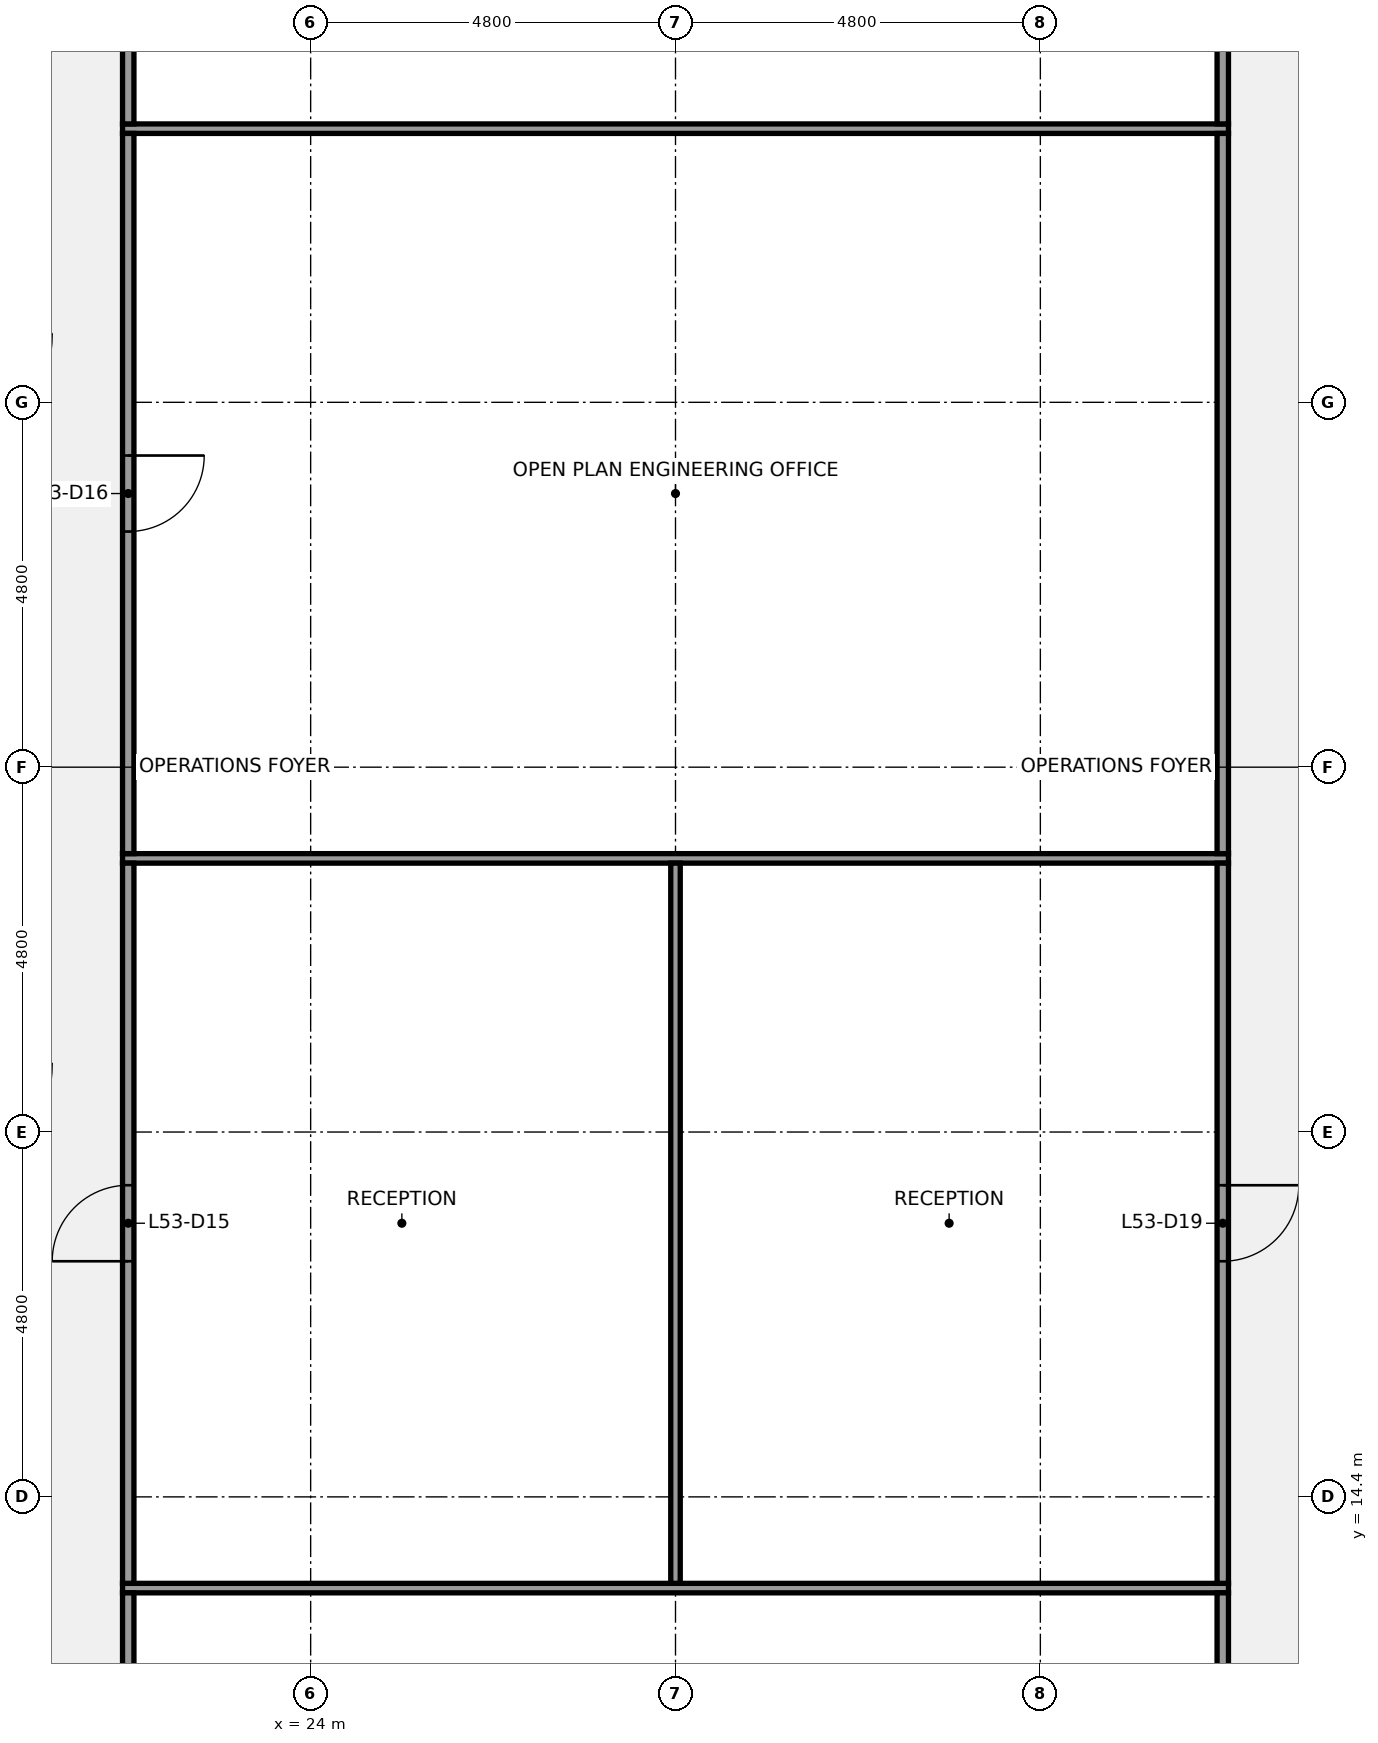
"""IFC4 building model, lengths in metres.
Left out: names, types, materials, properties, quantities, classifications, styles, units other than length and angle.
Written with IfcOpenShell. Run it as: python <this file> out.ifc"""

import sys

from ifc_helpers import new_model, si_unit, direction, frame, frame_2d, origin, place, context, subcontext, project, spatial, rectangle, extrude, element, fill, save


model = new_model("IFC4")
c1 = context("Model", 3, precision=1e-05, world=origin(), true_north=direction((0.0, 1.0)))
c2 = subcontext(c1, "Body", "Model", "MODEL_VIEW")
j1 = project(units=[si_unit("LENGTHUNIT", "METRE"), si_unit("PLANEANGLEUNIT", "RADIAN")], contexts=[c1])
p1 = place(None, origin())
s1 = spatial("IfcSite", under=j1, at=p1, CompositionType="ELEMENT")
p2 = place(p1, origin())
s2 = spatial("IfcBuilding", under=s1, at=p2, CompositionType="ELEMENT")
p3 = place(p2, frame((0.0, 0.0, 241.2)))
s3 = spatial("IfcBuildingStorey", under=s2, at=p3, CompositionType="ELEMENT", Elevation=241.2)
for number, where, z_axis, x_axis in (
    (1, (21.525, 13.2, 0.0), (0.0, 0.0, 1.0), (1.0, 0.0, 0.0)),
    (2, (21.525, 22.8, 0.0), (0.0, 0.0, 1.0), (1.0, 0.0, 0.0)),
    (3, (21.525, 32.4, 0.0), (0.0, 0.0, 1.0), (1.0, 0.0, 0.0)),
):
    element("IfcWall", number, at=place(p3, frame(where, z_axis=z_axis, x_axis=x_axis)), inside=s3, PredefinedType="PARTITIONING", context=c2, shape_type="SweptSolid", body=[
        extrude(rectangle(XDim=14.55, YDim=0.125, at=frame_2d((7.275, 0.0))), origin(), (0.0, 0.0, 1.0), 2.849),
    ])
p4 = place(p3, frame((21.6, 8.462, 0.0), z_axis=(0.0, 0.0, 1.0), x_axis=(0.0, 1.0, 0.0)))
e4 = element("IfcWall", 4, at=p4, inside=s3, PredefinedType="PARTITIONING", context=c2, shape_type="SweptSolid", body=[
    extrude(rectangle(XDim=4.675, YDim=0.15, at=frame_2d((2.337, 0.0))), origin(), (0.0, 0.0, 1.0), 2.849),
])
p5 = place(p4, frame((1.837, 0.0, 0.0)))
e5 = element("IfcOpeningElement", 5, at=p5, cuts=e4, PredefinedType="OPENING", context=c2, shape_type="SweptSolid", body=[
    extrude(rectangle(XDim=1.0, YDim=2.1, at=frame_2d((0.5, 1.05))), frame((0.0, 0.085, 0.0), z_axis=(0.0, -1.0, 0.0), x_axis=(1.0, 0.0, 0.0)), (0.0, 0.0, 1.0), 0.17),
])
p6 = place(p3, frame((21.6, 13.262, 0.0), z_axis=(0.0, 0.0, 1.0), x_axis=(0.0, 1.0, 0.0)))
e6 = element("IfcWall", 6, at=p6, inside=s3, PredefinedType="PARTITIONING", context=c2, shape_type="SweptSolid", body=[
    extrude(rectangle(XDim=9.475, YDim=0.15, at=frame_2d((4.738, 0.0))), origin(), (0.0, 0.0, 1.0), 2.849),
])
p7 = place(p6, frame((4.238, 0.0, 0.0)))
e7 = element("IfcOpeningElement", 7, at=p7, cuts=e6, PredefinedType="OPENING", context=c2, shape_type="SweptSolid", body=[
    extrude(rectangle(XDim=1.0, YDim=2.1, at=frame_2d((0.5, 1.05))), frame((0.0, 0.085, 0.0), z_axis=(0.0, -1.0, 0.0), x_axis=(1.0, 0.0, 0.0)), (0.0, 0.0, 1.0), 0.17),
])
p8 = place(p3, frame((21.6, 22.863, 0.0), z_axis=(0.0, 0.0, 1.0), x_axis=(0.0, 1.0, 0.0)))
e8 = element("IfcWall", 8, at=p8, inside=s3, PredefinedType="PARTITIONING", context=c2, shape_type="SweptSolid", body=[
    extrude(rectangle(XDim=9.475, YDim=0.15, at=frame_2d((4.737, 0.0))), origin(), (0.0, 0.0, 1.0), 2.849),
])
p9 = place(p8, frame((4.238, 0.0, 0.0)))
e9 = element("IfcOpeningElement", 9, at=p9, cuts=e8, PredefinedType="OPENING", context=c2, shape_type="SweptSolid", body=[
    extrude(rectangle(XDim=1.0, YDim=2.1, at=frame_2d((0.5, 1.05))), frame((0.0, 0.085, 0.0), z_axis=(0.0, -1.0, 0.0), x_axis=(1.0, 0.0, 0.0)), (0.0, 0.0, 1.0), 0.17),
])
p10 = place(p3, frame((21.6, 32.462, 0.0), z_axis=(0.0, 0.0, 1.0), x_axis=(0.0, 1.0, 0.0)))
e10 = element("IfcWall", 10, at=p10, inside=s3, PredefinedType="PARTITIONING", context=c2, shape_type="SweptSolid", body=[
    extrude(rectangle(XDim=3.475, YDim=0.15, at=frame_2d((1.738, 0.0))), origin(), (0.0, 0.0, 1.0), 2.849),
])
p11 = place(p10, frame((1.238, 0.0, 0.0)))
e11 = element("IfcOpeningElement", 11, at=p11, cuts=e10, PredefinedType="OPENING", context=c2, shape_type="SweptSolid", body=[
    extrude(rectangle(XDim=1.0, YDim=2.1, at=frame_2d((0.5, 1.05))), frame((0.0, 0.085, 0.0), z_axis=(0.0, -1.0, 0.0), x_axis=(1.0, 0.0, 0.0)), (0.0, 0.0, 1.0), 0.17),
])
p12 = place(p3, frame((28.8, 13.262, 0.0), z_axis=(0.0, 0.0, 1.0), x_axis=(0.0, 1.0, 0.0)))
e12 = element("IfcWall", 12, at=p12, inside=s3, PredefinedType="PARTITIONING", context=c2, shape_type="SweptSolid", body=[
    extrude(rectangle(XDim=9.475, YDim=0.125, at=frame_2d((4.738, 0.0))), origin(), (0.0, 0.0, 1.0), 2.849),
])
p13 = place(p3, frame((36.0, 8.462, 0.0), z_axis=(0.0, 0.0, 1.0), x_axis=(0.0, 1.0, 0.0)))
e13 = element("IfcWall", 13, at=p13, inside=s3, PredefinedType="PARTITIONING", context=c2, shape_type="SweptSolid", body=[
    extrude(rectangle(XDim=4.675, YDim=0.15, at=frame_2d((2.337, 0.0))), origin(), (0.0, 0.0, 1.0), 2.849),
])
p14 = place(p3, frame((36.0, 13.262, 0.0), z_axis=(0.0, 0.0, 1.0), x_axis=(0.0, 1.0, 0.0)))
e14 = element("IfcWall", 14, at=p14, inside=s3, PredefinedType="PARTITIONING", context=c2, shape_type="SweptSolid", body=[
    extrude(rectangle(XDim=9.475, YDim=0.15, at=frame_2d((4.738, 0.0))), origin(), (0.0, 0.0, 1.0), 2.849),
])
p15 = place(p14, frame((4.238, 0.0, 0.0)))
e15 = element("IfcOpeningElement", 15, at=p15, cuts=e14, PredefinedType="OPENING", context=c2, shape_type="SweptSolid", body=[
    extrude(rectangle(XDim=1.0, YDim=2.1, at=frame_2d((0.5, 1.05))), frame((0.0, 0.085, 0.0), z_axis=(0.0, -1.0, 0.0), x_axis=(1.0, 0.0, 0.0)), (0.0, 0.0, 1.0), 0.17),
])
p16 = place(p3, frame((36.0, 22.863, 0.0), z_axis=(0.0, 0.0, 1.0), x_axis=(0.0, 1.0, 0.0)))
e16 = element("IfcWall", 16, at=p16, inside=s3, PredefinedType="PARTITIONING", context=c2, shape_type="SweptSolid", body=[
    extrude(rectangle(XDim=9.475, YDim=0.15, at=frame_2d((4.737, 0.0))), origin(), (0.0, 0.0, 1.0), 2.849),
])
p17 = place(p3, frame((36.0, 32.462, 0.0), z_axis=(0.0, 0.0, 1.0), x_axis=(0.0, 1.0, 0.0)))
e17 = element("IfcWall", 17, at=p17, inside=s3, PredefinedType="PARTITIONING", context=c2, shape_type="SweptSolid", body=[
    extrude(rectangle(XDim=3.475, YDim=0.15, at=frame_2d((1.738, 0.0))), origin(), (0.0, 0.0, 1.0), 2.849),
])
p18 = place(p7, origin())
e18 = element("IfcDoor", 18, at=p18, inside=s3, OperationType="SINGLE_SWING_LEFT", PredefinedType="DOOR", context=c2, shape_type="SweptSolid", body=[
    extrude(rectangle(XDim=1.0, YDim=2.1, at=frame_2d((0.5, 1.05))), frame((0.0, 0.025, 0.0), z_axis=(0.0, -1.0, 0.0), x_axis=(1.0, 0.0, 0.0)), (0.0, 0.0, 1.0), 0.05),
])
fill(e7, e18)
p19 = place(p9, origin())
e19 = element("IfcDoor", 19, at=p19, inside=s3, OperationType="SINGLE_SWING_RIGHT", PredefinedType="DOOR", context=c2, shape_type="SweptSolid", body=[
    extrude(rectangle(XDim=1.0, YDim=2.1, at=frame_2d((0.5, 1.05))), frame((0.0, 0.025, 0.0), z_axis=(0.0, -1.0, 0.0), x_axis=(1.0, 0.0, 0.0)), (0.0, 0.0, 1.0), 0.05),
])
fill(e9, e19)
p20 = place(p15, origin())
e20 = element("IfcDoor", 20, at=p20, inside=s3, OperationType="SINGLE_SWING_RIGHT", PredefinedType="DOOR", context=c2, shape_type="SweptSolid", body=[
    extrude(rectangle(XDim=1.0, YDim=2.1, at=frame_2d((0.5, 1.05))), frame((0.0, 0.025, 0.0), z_axis=(0.0, -1.0, 0.0), x_axis=(1.0, 0.0, 0.0)), (0.0, 0.0, 1.0), 0.05),
])
fill(e15, e20)
save(model, sys.argv[1])
